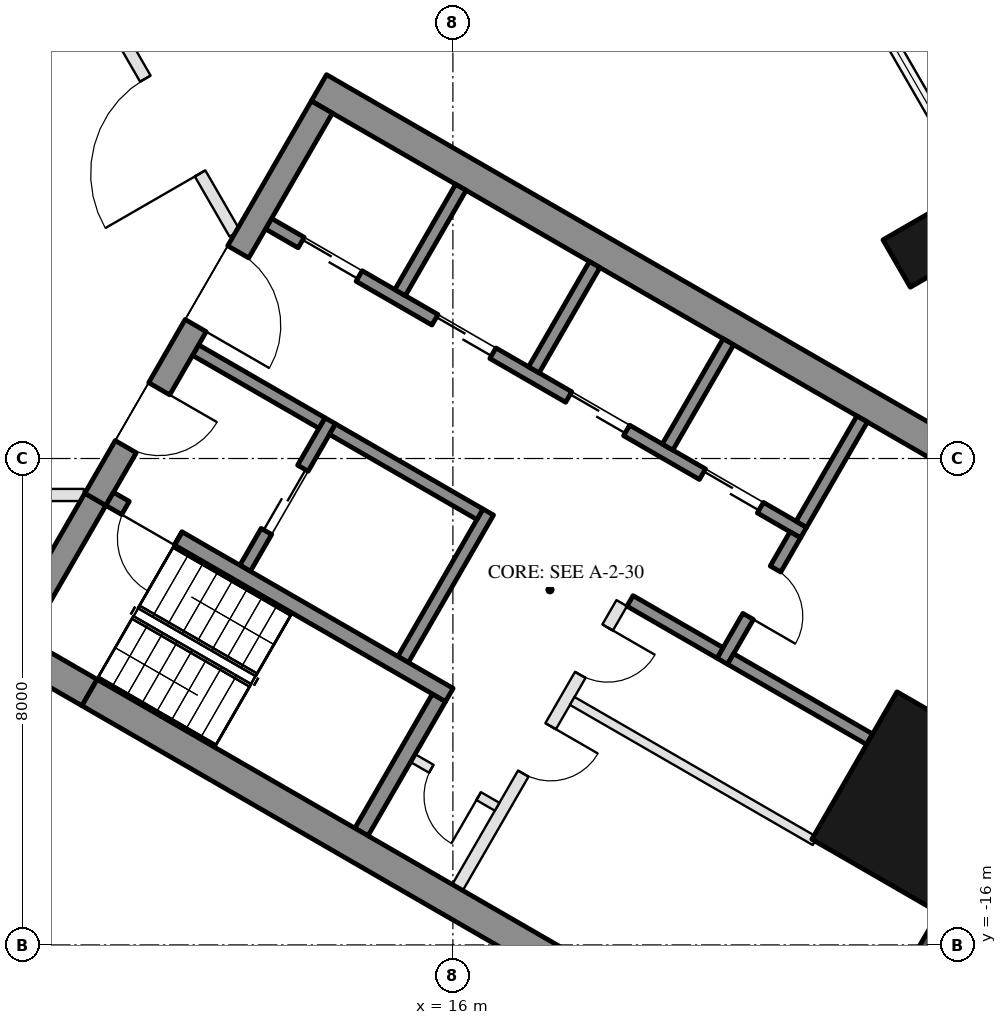
"""IFC4 building model, lengths in metres.
Left out: names, types, materials, properties, quantities, classifications, styles, units other than length and angle.
Written with IfcOpenShell. Run it as: python <this file> out.ifc"""

import sys

from ifc_helpers import new_model, si_unit, direction, frame, frame_2d, origin, origin_2d, place, context, subcontext, project, spatial, rectangle, hollow_rectangle, extrude, element, fill, save


model = new_model("IFC4")
c1 = context("Model", 3, precision=1e-05, world=origin(), true_north=direction((0.0, 1.0)))
c2 = subcontext(c1, "Body", "Model", "MODEL_VIEW")
j1 = project(units=[si_unit("LENGTHUNIT", "METRE"), si_unit("PLANEANGLEUNIT", "RADIAN")], contexts=[c1])
p1 = place(None, origin())
s1 = spatial("IfcSite", under=j1, at=p1, CompositionType="ELEMENT")
p2 = place(p1, origin())
s2 = spatial("IfcBuilding", under=s1, at=p2, CompositionType="ELEMENT")
p3 = place(p2, frame((0.0, 0.0, 131.6)))
s3 = spatial("IfcBuildingStorey", under=s2, at=p3, CompositionType="ELEMENT", Elevation=131.6)
p4 = place(p3, frame((23.688, -4.568, 0.0), z_axis=(0.0, 0.0, 1.0), x_axis=(-0.5, 0.866025403784, 0.0)))
e1 = element("IfcColumn", 1, at=p4, inside=s3, PredefinedType="COLUMN", context=c2, shape_type="SweptSolid", body=[
    extrude(hollow_rectangle(XDim=0.9, YDim=0.9, WallThickness=0.04, at=origin_2d()), origin(), (0.0, 0.0, 1.0), 6.0),
])
p5 = place(p3, frame((23.643, -13.65, 0.0), z_axis=(0.0, 0.0, 1.0), x_axis=(0.5, 0.866025403784, 0.0)))
e2 = element("IfcColumn", 2, at=p5, inside=s3, PredefinedType="COLUMN", context=c2, shape_type="SweptSolid", body=[
    extrude(hollow_rectangle(XDim=2.8, YDim=2.4, WallThickness=0.07, at=origin_2d()), origin(), (0.0, 0.0, 1.0), 6.0),
])
p6 = place(p3, frame((23.427, -16.792, 0.0), z_axis=(0.0, 0.0, 1.0), x_axis=(0.499986410639, 0.866033249463, 0.0)))
e3 = element("IfcWall", 3, at=p6, inside=s3, PredefinedType="SOLIDWALL", context=c2, shape_type="SweptSolid", body=[
    extrude(rectangle(XDim=5.658, YDim=0.35, at=frame_2d((2.829, 0.0))), origin(), (0.0, 0.0, 1.0), 5.7),
])
p7 = place(p3, frame((13.797, -1.903, 0.0), z_axis=(0.0, 0.0, 1.0), x_axis=(0.866025009528, -0.500000682871, 0.0)))
e4 = element("IfcWall", 4, at=p7, inside=s3, PredefinedType="SHEAR", context=c2, shape_type="SweptSolid", body=[
    extrude(rectangle(XDim=14.837, YDim=0.5, at=frame_2d((7.418, 0.0))), origin(), (0.0, 0.0, 1.0), 5.7),
])
p8 = place(p3, frame((14.496, -14.143, 0.0), z_axis=(0.0, 0.0, 1.0), x_axis=(0.500062241894, 0.865989465428, 0.0)))
e5 = element("IfcWall", 5, at=p8, inside=s3, PredefinedType="SHEAR", context=c2, shape_type="SweptSolid", body=[
    extrude(rectangle(XDim=2.55, YDim=0.25, at=frame_2d((1.275, 0.0))), origin(), (0.0, 0.0, 1.0), 5.7),
])
p9 = place(p3, frame((15.181, -11.305, 0.0), z_axis=(0.0, 0.0, 1.0), x_axis=(0.49994636267, 0.866056369097, 0.0)))
e6 = element("IfcWall", 6, at=p9, inside=s3, PredefinedType="SHEAR", context=c2, shape_type="SweptSolid", body=[
    extrude(rectangle(XDim=2.8, YDim=0.2, at=frame_2d((1.4, 0.0))), origin(), (0.0, 0.0, 1.0), 5.7),
])
p10 = place(p3, frame((12.583, -9.805, 0.0), z_axis=(0.0, 0.0, 1.0), x_axis=(0.49994636267, 0.866056369097, 0.0)))
e7 = element("IfcWall", 7, at=p10, inside=s3, PredefinedType="SHEAR", context=c2, shape_type="SweptSolid", body=[
    extrude(rectangle(XDim=2.8, YDim=0.2, at=frame_2d((1.4, 0.0))), origin(), (0.0, 0.0, 1.0), 5.7),
])
p11 = place(p10, frame((0.7, 0.0, 0.0)))
e8 = element("IfcOpeningElement", 8, at=p11, cuts=e7, PredefinedType="OPENING", context=c2, shape_type="SweptSolid", body=[
    extrude(rectangle(XDim=1.2, YDim=2.1, at=frame_2d((0.6, 1.05))), frame((0.0, 0.11, 0.0), z_axis=(0.0, -1.0, 0.0), x_axis=(1.0, 0.0, 0.0)), (0.0, 0.0, 1.0), 0.22),
])
p12 = place(p3, frame((11.768, -6.217, 0.0), z_axis=(0.0, 0.0, 1.0), x_axis=(0.866050077142, -0.499957262057, 0.0)))
e9 = element("IfcWall", 9, at=p12, inside=s3, PredefinedType="SHEAR", context=c2, shape_type="SweptSolid", body=[
    extrude(rectangle(XDim=2.4, YDim=0.2, at=frame_2d((1.2, 0.0))), origin(), (0.0, 0.0, 1.0), 5.7),
])
p13 = place(p3, frame((14.02, -7.517, 0.0), z_axis=(0.0, 0.0, 1.0), x_axis=(0.866034573852, -0.49998411664, 0.0)))
e10 = element("IfcWall", 10, at=p13, inside=s3, PredefinedType="SHEAR", context=c2, shape_type="SweptSolid", body=[
    extrude(rectangle(XDim=2.8, YDim=0.2, at=frame_2d((1.4, 0.0))), origin(), (0.0, 0.0, 1.0), 5.7),
])
p14 = place(p3, frame((12.968, -4.138, 0.0), z_axis=(0.0, 0.0, 1.0), x_axis=(0.866028328073, -0.49999493495, 0.0)))
e11 = element("IfcWall", 11, at=p14, inside=s3, PredefinedType="SHEAR", context=c2, shape_type="SweptSolid", body=[
    extrude(rectangle(XDim=10.16, YDim=0.2, at=frame_2d((5.08, 0.0))), origin(), (0.0, 0.0, 1.0), 5.7),
])
p15 = place(p14, frame((0.62, 0.0, 0.0)))
e12 = element("IfcOpeningElement", 12, at=p15, cuts=e11, PredefinedType="OPENING", context=c2, shape_type="SweptSolid", body=[
    extrude(rectangle(XDim=1.1, YDim=2.1, at=frame_2d((0.55, 1.05))), frame((0.0, 0.11, 0.0), z_axis=(0.0, -1.0, 0.0), x_axis=(1.0, 0.0, 0.0)), (0.0, 0.0, 1.0), 0.22),
])
p16 = place(p14, frame((3.16, 0.0, 0.0)))
e13 = element("IfcOpeningElement", 13, at=p16, cuts=e11, PredefinedType="OPENING", context=c2, shape_type="SweptSolid", body=[
    extrude(rectangle(XDim=1.1, YDim=2.1, at=frame_2d((0.55, 1.05))), frame((0.0, 0.11, 0.0), z_axis=(0.0, -1.0, 0.0), x_axis=(1.0, 0.0, 0.0)), (0.0, 0.0, 1.0), 0.22),
])
p17 = place(p14, frame((5.7, 0.0, 0.0)))
e14 = element("IfcOpeningElement", 14, at=p17, cuts=e11, PredefinedType="OPENING", context=c2, shape_type="SweptSolid", body=[
    extrude(rectangle(XDim=1.1, YDim=2.1, at=frame_2d((0.55, 1.05))), frame((0.0, 0.11, 0.0), z_axis=(0.0, -1.0, 0.0), x_axis=(1.0, 0.0, 0.0)), (0.0, 0.0, 1.0), 0.22),
])
p18 = place(p14, frame((8.24, 0.0, 0.0)))
e15 = element("IfcOpeningElement", 15, at=p18, cuts=e11, PredefinedType="OPENING", context=c2, shape_type="SweptSolid", body=[
    extrude(rectangle(XDim=1.1, YDim=2.1, at=frame_2d((0.55, 1.05))), frame((0.0, 0.11, 0.0), z_axis=(0.0, -1.0, 0.0), x_axis=(1.0, 0.0, 0.0)), (0.0, 0.0, 1.0), 0.22),
])
p19 = place(p3, frame((20.43, -11.333, 0.0), z_axis=(0.0, 0.0, 1.0), x_axis=(0.500001309137, 0.866024647952, 0.0)))
e16 = element("IfcWall", 16, at=p19, inside=s3, PredefinedType="SHEAR", context=c2, shape_type="SweptSolid", body=[
    extrude(rectangle(XDim=2.4, YDim=0.2, at=frame_2d((1.2, 0.0))), origin(), (0.0, 0.0, 1.0), 5.7),
])
p20 = place(p19, frame((0.85, 0.0, 0.0)))
e17 = element("IfcOpeningElement", 17, at=p20, cuts=e16, PredefinedType="OPENING", context=c2, shape_type="SweptSolid", body=[
    extrude(rectangle(XDim=0.9, YDim=2.1, at=frame_2d((0.45, 1.05))), frame((0.0, 0.11, 0.0), z_axis=(0.0, -1.0, 0.0), x_axis=(1.0, 0.0, 0.0)), (0.0, 0.0, 1.0), 0.22),
])
p21 = place(p3, frame((18.913, -10.342, 0.0), z_axis=(0.0, 0.0, 1.0), x_axis=(0.866038183914, -0.499977863513, 0.0)))
e18 = element("IfcWall", 18, at=p21, inside=s3, PredefinedType="SHEAR", context=c2, shape_type="SweptSolid", body=[
    extrude(rectangle(XDim=1.71, YDim=0.2, at=frame_2d((0.855, 0.0))), origin(), (0.0, 0.0, 1.0), 5.7),
])
for number, where, z_axis, x_axis in (
    (19, (15.131, -5.272, 0.0), (0.0, 0.0, 1.0), (0.5, 0.866, 0.0)),
    (20, (17.331, -6.542, 0.0), (0.0, 0.0, 1.0), (0.5, 0.866, 0.0)),
    (21, (19.531, -7.812, 0.0), (0.0, 0.0, 1.0), (0.5, 0.866, 0.0)),
    (22, (21.73, -9.082, 0.0), (0.0, 0.0, 1.0), (0.5, 0.866, 0.0)),
):
    element("IfcWall", number, at=place(p3, frame(where, z_axis=z_axis, x_axis=x_axis)), inside=s3, PredefinedType="SHEAR", context=c2, shape_type="SweptSolid", body=[
        extrude(rectangle(XDim=2.0, YDim=0.2, at=frame_2d((1.0, 0.0))), origin(), (0.0, 0.0, 1.0), 5.7),
    ])
p22 = place(p3, frame((20.567, -11.297, 0.0), z_axis=(0.0, 0.0, 1.0), x_axis=(0.866060851709, -0.499938597367, 0.0)))
e23 = element("IfcWall", 23, at=p22, inside=s3, PredefinedType="SHEAR", context=c2, shape_type="SweptSolid", body=[
    extrude(rectangle(XDim=2.64, YDim=0.2, at=frame_2d((1.32, 0.0))), origin(), (0.0, 0.0, 1.0), 5.7),
])
p23 = place(p3, frame((16.076, -15.055, 0.0), z_axis=(0.0, 0.0, 1.0), x_axis=(0.499995103361, 0.866028230842, 0.0)))
e24 = element("IfcWall", 24, at=p23, inside=s3, PredefinedType="PARTITIONING", context=c2, shape_type="SweptSolid", body=[
    extrude(rectangle(XDim=5.4, YDim=0.2, at=frame_2d((2.7, 0.0))), origin(), (0.0, 0.0, 1.0), 5.7),
])
p24 = place(p23, frame((2.163, 0.0, 0.0)))
e25 = element("IfcOpeningElement", 25, at=p24, cuts=e24, PredefinedType="OPENING", context=c2, shape_type="SweptSolid", body=[
    extrude(rectangle(XDim=0.9, YDim=2.1, at=frame_2d((0.45, 1.05))), frame((0.0, 0.11, 0.0), z_axis=(0.0, -1.0, 0.0), x_axis=(1.0, 0.0, 0.0)), (0.0, 0.0, 1.0), 0.22),
])
p25 = place(p23, frame((4.038, 0.0, 0.0)))
e26 = element("IfcOpeningElement", 26, at=p25, cuts=e24, PredefinedType="OPENING", context=c2, shape_type="SweptSolid", body=[
    extrude(rectangle(XDim=0.9, YDim=2.1, at=frame_2d((0.45, 1.05))), frame((0.0, 0.11, 0.0), z_axis=(0.0, -1.0, 0.0), x_axis=(1.0, 0.0, 0.0)), (0.0, 0.0, 1.0), 0.22),
])
p26 = place(p3, frame((15.342, -12.928, 0.0), z_axis=(0.0, 0.0, 1.0), x_axis=(0.865989903783, -0.500061482766, 0.0)))
e27 = element("IfcWall", 27, at=p26, inside=s3, PredefinedType="PARTITIONING", context=c2, shape_type="SweptSolid", body=[
    extrude(rectangle(XDim=1.6, YDim=0.15, at=frame_2d((0.8, 0.0))), origin(), (0.0, 0.0, 1.0), 5.7),
])
p27 = place(p26, frame((0.35, 0.0, 0.0)))
e28 = element("IfcOpeningElement", 28, at=p27, cuts=e27, PredefinedType="OPENING", context=c2, shape_type="SweptSolid", body=[
    extrude(rectangle(XDim=0.9, YDim=2.1, at=frame_2d((0.45, 1.05))), frame((0.0, 0.085, 0.0), z_axis=(0.0, -1.0, 0.0), x_axis=(1.0, 0.0, 0.0)), (0.0, 0.0, 1.0), 0.17),
])
p28 = place(p3, frame((17.963, -11.987, 0.0), z_axis=(0.0, 0.0, 1.0), x_axis=(0.865998608524, -0.500046407882, 0.0)))
e29 = element("IfcWall", 29, at=p28, inside=s3, PredefinedType="PARTITIONING", context=c2, shape_type="SweptSolid", body=[
    extrude(rectangle(XDim=4.61, YDim=0.15, at=frame_2d((2.305, 0.0))), origin(), (0.0, 0.0, 1.0), 5.7),
])
p29 = place(p3, frame((8.547, -10.997, 0.0), z_axis=(0.0, 0.0, 1.0), x_axis=(0.866033076574, -0.499986710104, 0.0)))
e30 = element("IfcWall", 30, at=p29, inside=s3, PredefinedType="SHEAR", context=c2, shape_type="SweptSolid", body=[
    extrude(rectangle(XDim=1.706, YDim=0.5, at=frame_2d((0.853, 0.0))), origin(), (0.0, 0.0, 1.0), 5.7),
])
p30 = place(p3, frame((10.024, -11.85, 0.0), z_axis=(0.0, 0.0, 1.0), x_axis=(0.86602396135, -0.500002498361, 0.0)))
e31 = element("IfcWall", 31, at=p30, inside=s3, PredefinedType="SHEAR", context=c2, shape_type="SweptSolid", body=[
    extrude(rectangle(XDim=13.131, YDim=0.5, at=frame_2d((6.565, 0.0))), origin(), (0.0, 0.0, 1.0), 5.7),
])
p31 = place(p3, frame((8.845, -10.88, 0.0), z_axis=(0.0, 0.0, 1.0), x_axis=(0.499990435942, 0.866030925526, 0.0)))
e32 = element("IfcWall", 32, at=p31, inside=s3, PredefinedType="SHEAR", context=c2, shape_type="SweptSolid", body=[
    extrude(rectangle(XDim=2.55, YDim=0.4, at=frame_2d((1.275, 0.0))), origin(), (0.0, 0.0, 1.0), 5.7),
])
p32 = place(p3, frame((10.12, -8.672, 0.0), z_axis=(0.0, 0.0, 1.0), x_axis=(0.500008956979, 0.866020232408, 0.0)))
e33 = element("IfcWall", 33, at=p32, inside=s3, PredefinedType="SHEAR", context=c2, shape_type="SweptSolid", body=[
    extrude(rectangle(XDim=7.45, YDim=0.4, at=frame_2d((3.725, 0.0))), origin(), (0.0, 0.0, 1.0), 5.7),
])
p33 = place(p32, frame((1.0, 0.0, 0.0)))
e34 = element("IfcOpeningElement", 34, at=p33, cuts=e33, PredefinedType="OPENING", context=c2, shape_type="SweptSolid", body=[
    extrude(rectangle(XDim=1.1, YDim=2.1, at=frame_2d((0.55, 1.05))), frame((0.0, 0.21, 0.0), z_axis=(0.0, -1.0, 0.0), x_axis=(1.0, 0.0, 0.0)), (0.0, 0.0, 1.0), 0.42),
])
p34 = place(p32, frame((3.3, 0.0, 0.0)))
e35 = element("IfcOpeningElement", 35, at=p34, cuts=e33, PredefinedType="OPENING", context=c2, shape_type="SweptSolid", body=[
    extrude(rectangle(XDim=1.4, YDim=2.1, at=frame_2d((0.7, 1.05))), frame((0.0, 0.21, 0.0), z_axis=(0.0, -1.0, 0.0), x_axis=(1.0, 0.0, 0.0)), (0.0, 0.0, 1.0), 0.42),
])
p35 = place(p3, frame((10.356, -8.664, 0.0), z_axis=(0.0, 0.0, 1.0), x_axis=(0.866095317631, -0.499878886109, 0.0)))
e36 = element("IfcWall", 36, at=p35, inside=s3, PredefinedType="SHEAR", context=c2, shape_type="SweptSolid", body=[
    extrude(rectangle(XDim=1.306, YDim=0.25, at=frame_2d((0.653, 0.0))), origin(), (0.0, 0.0, 1.0), 5.7),
])
p36 = place(p35, frame((0.3, 0.0, 0.0)))
e37 = element("IfcOpeningElement", 37, at=p36, cuts=e36, PredefinedType="OPENING", context=c2, shape_type="SweptSolid", body=[
    extrude(rectangle(XDim=1.0, YDim=2.1, at=frame_2d((0.5, 1.05))), frame((0.0, 0.135, 0.0), z_axis=(0.0, -1.0, 0.0), x_axis=(1.0, 0.0, 0.0)), (0.0, 0.0, 1.0), 0.27),
])
p37 = place(p3, frame((11.487, -9.316, 0.0), z_axis=(0.0, 0.0, 1.0), x_axis=(0.866011695431, -0.500023742813, 0.0)))
e38 = element("IfcWall", 38, at=p37, inside=s3, PredefinedType="SHEAR", context=c2, shape_type="SweptSolid", body=[
    extrude(rectangle(XDim=5.144, YDim=0.25, at=frame_2d((2.572, 0.0))), origin(), (0.0, 0.0, 1.0), 5.7),
])
p38 = place(p3, frame((-9.93, -8.6, 0.0), z_axis=(0.0, 0.0, 1.0), x_axis=(1.0, 0.0, 0.0)))
e39 = element("IfcWall", 39, at=p38, inside=s3, PredefinedType="PARTITIONING", context=c2, shape_type="SweptSolid", body=[
    extrude(rectangle(XDim=19.861, YDim=0.2, at=frame_2d((9.93, 0.0))), origin(), (0.0, 0.0, 1.0), 4.91),
])
p39 = place(p38, frame((1.384, 0.0, 0.0)))
e40 = element("IfcOpeningElement", 40, at=p39, cuts=e39, PredefinedType="OPENING", context=c2, shape_type="SweptSolid", body=[
    extrude(rectangle(XDim=1.2, YDim=2.1, at=frame_2d((0.6, 1.05))), frame((0.0, 0.11, 0.0), z_axis=(0.0, -1.0, 0.0), x_axis=(1.0, 0.0, 0.0)), (0.0, 0.0, 1.0), 0.22),
])
p40 = place(p38, frame((6.012, 0.0, 0.0)))
e41 = element("IfcOpeningElement", 41, at=p40, cuts=e39, PredefinedType="OPENING", context=c2, shape_type="SweptSolid", body=[
    extrude(rectangle(XDim=1.8, YDim=2.4, at=frame_2d((0.9, 1.2))), frame((0.0, 0.11, 0.0), z_axis=(0.0, -1.0, 0.0), x_axis=(1.0, 0.0, 0.0)), (0.0, 0.0, 1.0), 0.22),
])
p41 = place(p38, frame((12.049, 0.0, 0.0)))
e42 = element("IfcOpeningElement", 42, at=p41, cuts=e39, PredefinedType="OPENING", context=c2, shape_type="SweptSolid", body=[
    extrude(rectangle(XDim=1.8, YDim=2.4, at=frame_2d((0.9, 1.2))), frame((0.0, 0.11, 0.0), z_axis=(0.0, -1.0, 0.0), x_axis=(1.0, 0.0, 0.0)), (0.0, 0.0, 1.0), 0.22),
])
p42 = place(p38, frame((17.377, 0.0, 0.0)))
e43 = element("IfcOpeningElement", 43, at=p42, cuts=e39, PredefinedType="OPENING", context=c2, shape_type="SweptSolid", body=[
    extrude(rectangle(XDim=1.0, YDim=2.1, at=frame_2d((0.5, 1.05))), frame((0.0, 0.11, 0.0), z_axis=(0.0, -1.0, 0.0), x_axis=(1.0, 0.0, 0.0)), (0.0, 0.0, 1.0), 0.22),
])
p43 = place(p3, frame((12.413, -4.3, 0.0), z_axis=(0.0, 0.0, 1.0), x_axis=(-0.50000478328, 0.866022642139, 0.0)))
e44 = element("IfcWall", 44, at=p43, inside=s3, PredefinedType="PARTITIONING", context=c2, shape_type="SweptSolid", body=[
    extrude(rectangle(XDim=19.861, YDim=0.2, at=frame_2d((9.931, 0.0))), origin(), (0.0, 0.0, 1.0), 4.91),
])
p44 = place(p43, frame((1.142, 0.0, 0.0)))
e45 = element("IfcOpeningElement", 45, at=p44, cuts=e44, PredefinedType="OPENING", context=c2, shape_type="SweptSolid", body=[
    extrude(rectangle(XDim=1.8, YDim=2.4, at=frame_2d((0.9, 1.2))), frame((0.0, 0.11, 0.0), z_axis=(0.0, -1.0, 0.0), x_axis=(1.0, 0.0, 0.0)), (0.0, 0.0, 1.0), 0.22),
])
p45 = place(p43, frame((4.325, 0.0, 0.0)))
e46 = element("IfcOpeningElement", 46, at=p45, cuts=e44, PredefinedType="OPENING", context=c2, shape_type="SweptSolid", body=[
    extrude(rectangle(XDim=1.8, YDim=2.4, at=frame_2d((0.9, 1.2))), frame((0.0, 0.11, 0.0), z_axis=(0.0, -1.0, 0.0), x_axis=(1.0, 0.0, 0.0)), (0.0, 0.0, 1.0), 0.22),
])
p46 = place(p43, frame((8.355, 0.0, 0.0)))
e47 = element("IfcOpeningElement", 47, at=p46, cuts=e44, PredefinedType="OPENING", context=c2, shape_type="SweptSolid", body=[
    extrude(rectangle(XDim=1.2, YDim=2.1, at=frame_2d((0.6, 1.05))), frame((0.0, 0.11, 0.0), z_axis=(0.0, -1.0, 0.0), x_axis=(1.0, 0.0, 0.0)), (0.0, 0.0, 1.0), 0.22),
])
p47 = place(p43, frame((12.573, 0.0, 0.0)))
e48 = element("IfcOpeningElement", 48, at=p47, cuts=e44, PredefinedType="OPENING", context=c2, shape_type="SweptSolid", body=[
    extrude(rectangle(XDim=1.2, YDim=2.1, at=frame_2d((0.6, 1.05))), frame((0.0, 0.11, 0.0), z_axis=(0.0, -1.0, 0.0), x_axis=(1.0, 0.0, 0.0)), (0.0, 0.0, 1.0), 0.22),
])
p48 = place(p43, frame((17.032, 0.0, 0.0)))
e49 = element("IfcOpeningElement", 49, at=p48, cuts=e44, PredefinedType="OPENING", context=c2, shape_type="SweptSolid", body=[
    extrude(rectangle(XDim=1.2, YDim=2.1, at=frame_2d((0.6, 1.05))), frame((0.0, 0.11, 0.0), z_axis=(0.0, -1.0, 0.0), x_axis=(1.0, 0.0, 0.0)), (0.0, 0.0, 1.0), 0.22),
])
p49 = place(p11, origin())
e50 = element("IfcDoor", 50, at=p49, inside=s3, OperationType="DOUBLE_DOOR_SLIDING", PredefinedType="DOOR", context=c2, shape_type="SweptSolid", body=[
    extrude(rectangle(XDim=1.2, YDim=2.1, at=frame_2d((0.6, 1.05))), frame((0.0, 0.025, 0.0), z_axis=(0.0, -1.0, 0.0), x_axis=(1.0, 0.0, 0.0)), (0.0, 0.0, 1.0), 0.05),
])
fill(e8, e50)
p50 = place(p27, frame((0.9, 0.0, 0.0), z_axis=(0.0, 0.0, 1.0), x_axis=(-1.0, 0.0, 0.0)))
e51 = element("IfcDoor", 51, at=p50, inside=s3, OperationType="SINGLE_SWING_LEFT", PredefinedType="DOOR", context=c2, shape_type="SweptSolid", body=[
    extrude(rectangle(XDim=0.9, YDim=2.1, at=frame_2d((0.45, 1.05))), frame((0.0, 0.025, 0.0), z_axis=(0.0, -1.0, 0.0), x_axis=(1.0, 0.0, 0.0)), (0.0, 0.0, 1.0), 0.05),
])
fill(e28, e51)
p51 = place(p15, origin())
e52 = element("IfcDoor", 52, at=p51, inside=s3, OperationType="DOUBLE_DOOR_SLIDING", PredefinedType="DOOR", context=c2, shape_type="SweptSolid", body=[
    extrude(rectangle(XDim=1.1, YDim=2.1, at=frame_2d((0.55, 1.05))), frame((0.0, 0.025, 0.0), z_axis=(0.0, -1.0, 0.0), x_axis=(1.0, 0.0, 0.0)), (0.0, 0.0, 1.0), 0.05),
])
fill(e12, e52)
p52 = place(p16, origin())
e53 = element("IfcDoor", 53, at=p52, inside=s3, OperationType="DOUBLE_DOOR_SLIDING", PredefinedType="DOOR", context=c2, shape_type="SweptSolid", body=[
    extrude(rectangle(XDim=1.1, YDim=2.1, at=frame_2d((0.55, 1.05))), frame((0.0, 0.025, 0.0), z_axis=(0.0, -1.0, 0.0), x_axis=(1.0, 0.0, 0.0)), (0.0, 0.0, 1.0), 0.05),
])
fill(e13, e53)
p53 = place(p17, origin())
e54 = element("IfcDoor", 54, at=p53, inside=s3, OperationType="DOUBLE_DOOR_SLIDING", PredefinedType="DOOR", context=c2, shape_type="SweptSolid", body=[
    extrude(rectangle(XDim=1.1, YDim=2.1, at=frame_2d((0.55, 1.05))), frame((0.0, 0.025, 0.0), z_axis=(0.0, -1.0, 0.0), x_axis=(1.0, 0.0, 0.0)), (0.0, 0.0, 1.0), 0.05),
])
fill(e14, e54)
p54 = place(p18, origin())
e55 = element("IfcDoor", 55, at=p54, inside=s3, OperationType="DOUBLE_DOOR_SLIDING", PredefinedType="DOOR", context=c2, shape_type="SweptSolid", body=[
    extrude(rectangle(XDim=1.1, YDim=2.1, at=frame_2d((0.55, 1.05))), frame((0.0, 0.025, 0.0), z_axis=(0.0, -1.0, 0.0), x_axis=(1.0, 0.0, 0.0)), (0.0, 0.0, 1.0), 0.05),
])
fill(e15, e55)
p55 = place(p20, frame((0.9, 0.0, 0.0), z_axis=(0.0, 0.0, 1.0), x_axis=(-1.0, 0.0, 0.0)))
e56 = element("IfcDoor", 56, at=p55, inside=s3, OperationType="SINGLE_SWING_RIGHT", PredefinedType="DOOR", context=c2, shape_type="SweptSolid", body=[
    extrude(rectangle(XDim=0.9, YDim=2.1, at=frame_2d((0.45, 1.05))), frame((0.0, 0.025, 0.0), z_axis=(0.0, -1.0, 0.0), x_axis=(1.0, 0.0, 0.0)), (0.0, 0.0, 1.0), 0.05),
])
fill(e17, e56)
p56 = place(p24, frame((0.9, 0.0, 0.0), z_axis=(0.0, 0.0, 1.0), x_axis=(-1.0, 0.0, 0.0)))
e57 = element("IfcDoor", 57, at=p56, inside=s3, OperationType="SINGLE_SWING_LEFT", PredefinedType="DOOR", context=c2, shape_type="SweptSolid", body=[
    extrude(rectangle(XDim=0.9, YDim=2.1, at=frame_2d((0.45, 1.05))), frame((0.0, 0.025, 0.0), z_axis=(0.0, -1.0, 0.0), x_axis=(1.0, 0.0, 0.0)), (0.0, 0.0, 1.0), 0.05),
])
fill(e25, e57)
p57 = place(p25, frame((0.9, 0.0, 0.0), z_axis=(0.0, 0.0, 1.0), x_axis=(-1.0, 0.0, 0.0)))
e58 = element("IfcDoor", 58, at=p57, inside=s3, OperationType="SINGLE_SWING_LEFT", PredefinedType="DOOR", context=c2, shape_type="SweptSolid", body=[
    extrude(rectangle(XDim=0.9, YDim=2.1, at=frame_2d((0.45, 1.05))), frame((0.0, 0.025, 0.0), z_axis=(0.0, -1.0, 0.0), x_axis=(1.0, 0.0, 0.0)), (0.0, 0.0, 1.0), 0.05),
])
fill(e26, e58)
p58 = place(p33, frame((1.1, 0.0, 0.0), z_axis=(0.0, 0.0, 1.0), x_axis=(-1.0, 0.0, 0.0)))
e59 = element("IfcDoor", 59, at=p58, inside=s3, OperationType="SINGLE_SWING_LEFT", PredefinedType="DOOR", context=c2, shape_type="SweptSolid", body=[
    extrude(rectangle(XDim=1.1, YDim=2.1, at=frame_2d((0.55, 1.05))), frame((0.0, 0.025, 0.0), z_axis=(0.0, -1.0, 0.0), x_axis=(1.0, 0.0, 0.0)), (0.0, 0.0, 1.0), 0.05),
])
fill(e34, e59)
p59 = place(p34, frame((1.4, 0.0, 0.0), z_axis=(0.0, 0.0, 1.0), x_axis=(-1.0, 0.0, 0.0)))
e60 = element("IfcDoor", 60, at=p59, inside=s3, OperationType="DOUBLE_DOOR_SINGLE_SWING", PredefinedType="DOOR", context=c2, shape_type="SweptSolid", body=[
    extrude(rectangle(XDim=1.4, YDim=2.1, at=frame_2d((0.7, 1.05))), frame((0.0, 0.025, 0.0), z_axis=(0.0, -1.0, 0.0), x_axis=(1.0, 0.0, 0.0)), (0.0, 0.0, 1.0), 0.05),
])
fill(e35, e60)
p60 = place(p36, frame((1.0, 0.0, 0.0), z_axis=(0.0, 0.0, 1.0), x_axis=(-1.0, 0.0, 0.0)))
e61 = element("IfcDoor", 61, at=p60, inside=s3, OperationType="SINGLE_SWING_LEFT", PredefinedType="DOOR", context=c2, shape_type="SweptSolid", body=[
    extrude(rectangle(XDim=1.0, YDim=2.1, at=frame_2d((0.5, 1.05))), frame((0.0, 0.025, 0.0), z_axis=(0.0, -1.0, 0.0), x_axis=(1.0, 0.0, 0.0)), (0.0, 0.0, 1.0), 0.05),
])
fill(e37, e61)
p61 = place(p44, origin())
e62 = element("IfcDoor", 62, at=p61, inside=s3, OperationType="DOUBLE_DOOR_SINGLE_SWING", PredefinedType="DOOR", context=c2, shape_type="SweptSolid", body=[
    extrude(rectangle(XDim=1.8, YDim=2.4, at=frame_2d((0.9, 1.2))), frame((0.0, 0.025, 0.0), z_axis=(0.0, -1.0, 0.0), x_axis=(1.0, 0.0, 0.0)), (0.0, 0.0, 1.0), 0.05),
])
fill(e45, e62)
save(model, sys.argv[1])
